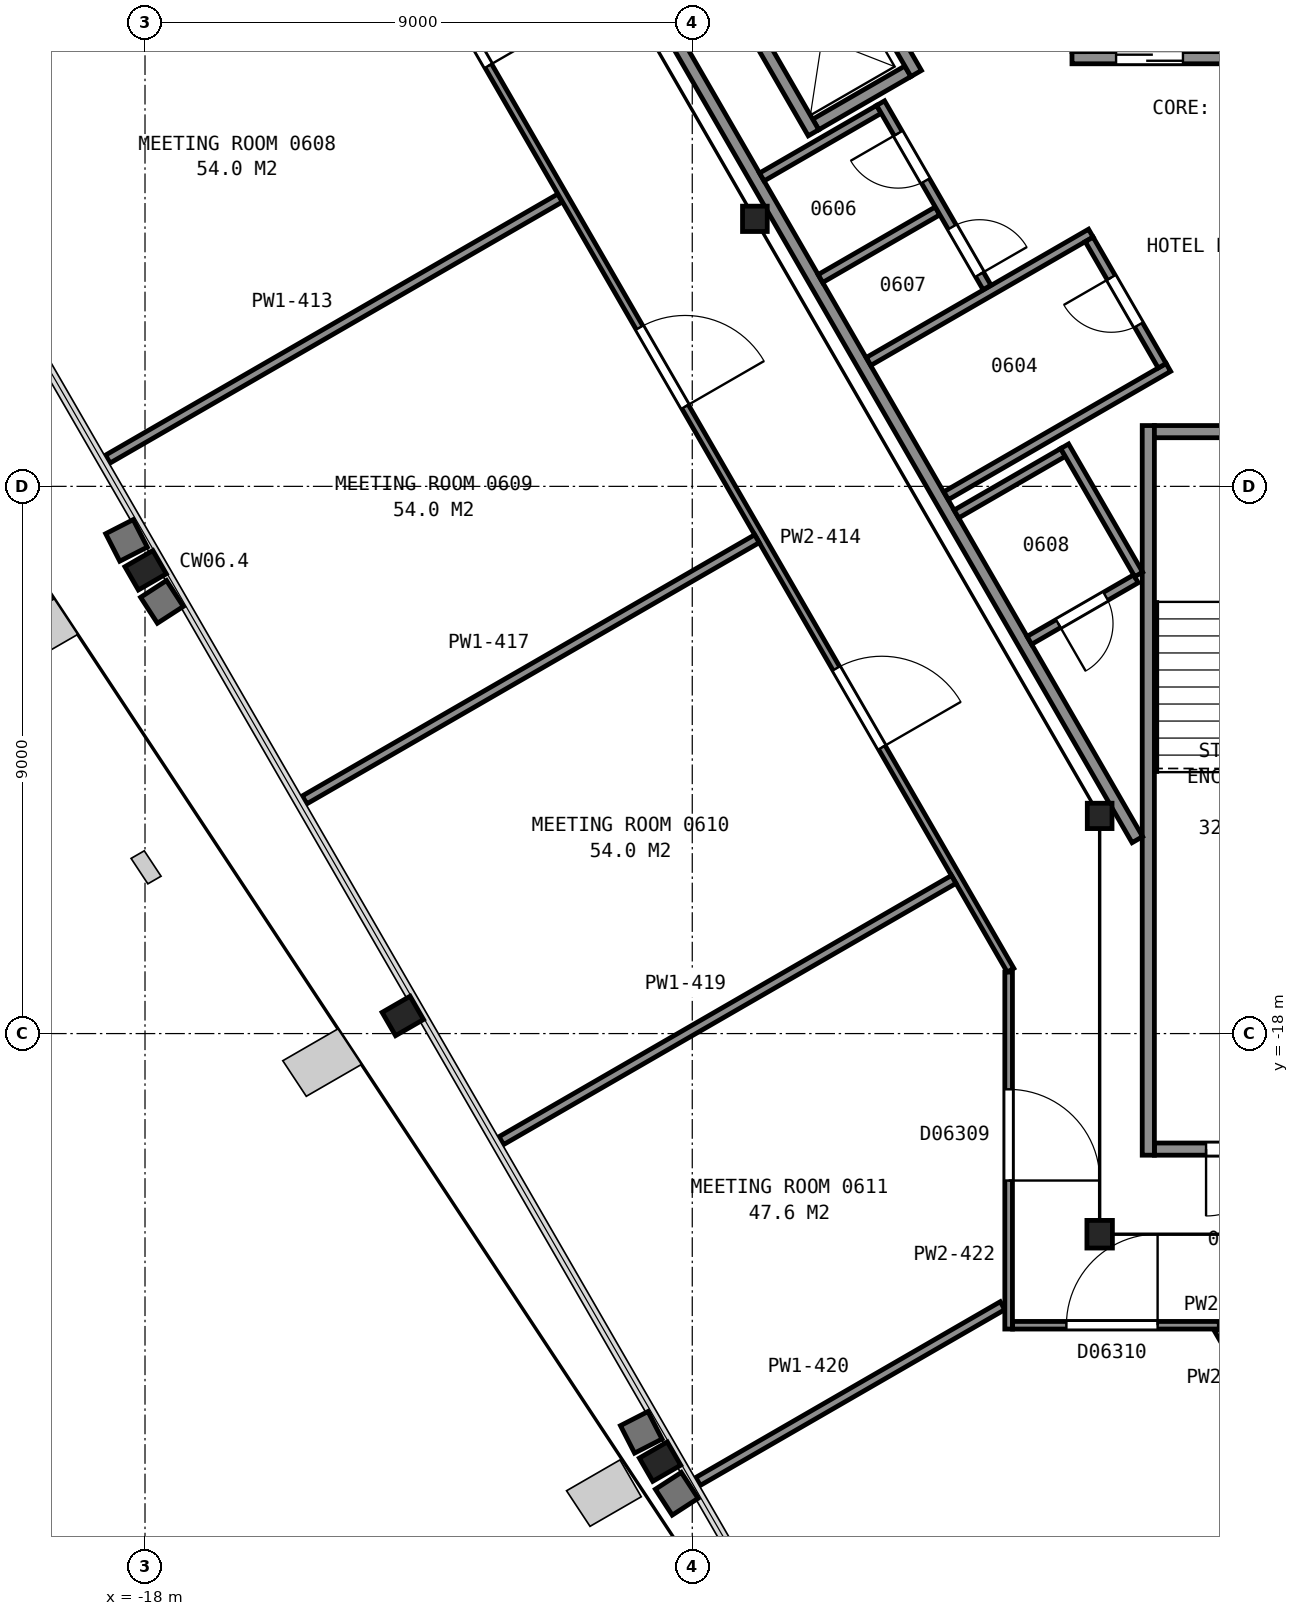
"""IFC4 building model, lengths in metres.
Left out: names, types, materials, properties, quantities, classifications, styles, units other than length and angle.
Written with IfcOpenShell. Run it as: python <this file> out.ifc"""

import sys

from ifc_helpers import new_model, si_unit, direction, frame, frame_2d, origin, origin_2d, place, context, subcontext, project, spatial, rectangle, i_section, extrude, element, fill, save


model = new_model("IFC4")
c1 = context("Model", 3, precision=1e-05, world=origin(), true_north=direction((0.0, 1.0)))
c2 = subcontext(c1, "Body", "Model", "MODEL_VIEW")
j1 = project(units=[si_unit("LENGTHUNIT", "METRE"), si_unit("PLANEANGLEUNIT", "RADIAN")], contexts=[c1])
p1 = place(None, origin())
s1 = spatial("IfcSite", under=j1, at=p1, CompositionType="ELEMENT")
p2 = place(p1, origin())
s2 = spatial("IfcBuilding", under=s1, at=p2, CompositionType="ELEMENT")
p3 = place(p2, frame((0.0, 0.0, 36.8)))
s3 = spatial("IfcBuildingStorey", under=s2, at=p3, CompositionType="ELEMENT", Elevation=36.8)
for number, where, z_axis, x_axis in (
    (1, (-17.99, -10.38, 0.025), (0.0, 0.0, 1.0), (-0.5, 0.866, 0.0)),
    (2, (-13.76, -17.71, 0.025), (0.0, 0.0, 1.0), (-0.5, 0.866, 0.0)),
):
    element("IfcColumn", number, at=place(p3, frame(where, z_axis=z_axis, x_axis=x_axis)), inside=s3, PredefinedType="COLUMN", context=c2, shape_type="SweptSolid", body=[
        extrude(i_section(OverallWidth=0.442, OverallDepth=0.531, WebThickness=0.066, FlangeThickness=0.106, FilletRadius=0.015, at=origin_2d()), origin(), (0.0, 0.0, 1.0), 3.575),
    ])
p4 = place(p3, frame((-9.53, -25.04, 0.03), z_axis=(0.0, 0.0, 1.0), x_axis=(-0.5, 0.866025403784, 0.0)))
e3 = element("IfcColumn", 3, at=p4, inside=s3, PredefinedType="COLUMN", context=c2, shape_type="SweptSolid", body=[
    extrude(i_section(OverallWidth=0.442, OverallDepth=0.531, WebThickness=0.066, FlangeThickness=0.106, FilletRadius=0.015, at=origin_2d()), origin(), (0.0, 0.0, 1.0), 3.57),
])
for number, where, z_axis, x_axis in (
    (4, (-7.97, -4.6, 0.0), (0.0, 0.0, 1.0), (1.0, 0.0, 0.0)),
    (5, (-2.3, -14.42, 0.0), (0.0, 0.0, 1.0), (1.0, 0.0, 0.0)),
):
    element("IfcColumn", number, at=place(p3, frame(where, z_axis=z_axis, x_axis=x_axis)), inside=s3, PredefinedType="COLUMN", context=c2, shape_type="SweptSolid", body=[
        extrude(i_section(OverallWidth=0.406, OverallDepth=0.417, WebThickness=0.03, FlangeThickness=0.048, FilletRadius=0.015, at=origin_2d()), origin(), (0.0, 0.0, 1.0), 3.6),
    ])
p5 = place(p3, frame((-2.3, -21.3, 0.0), z_axis=(0.0, 0.0, 1.0), x_axis=(-1.0, 0.0, 0.0)))
e6 = element("IfcColumn", 6, at=p5, inside=s3, PredefinedType="COLUMN", context=c2, shape_type="SweptSolid", body=[
    extrude(i_section(OverallWidth=0.419, OverallDepth=0.455, WebThickness=0.042, FlangeThickness=0.068, FilletRadius=0.015, at=origin_2d()), origin(), (0.0, 0.0, 1.0), 3.6),
])
p6 = place(p3, frame((-1.4, -19.9, 0.0), z_axis=(0.0, 0.0, 1.0), x_axis=(1.0, 0.0, 0.0)))
e7 = element("IfcWall", 7, at=p6, inside=s3, PredefinedType="PARTITIONING", context=c2, shape_type="SweptSolid", body=[
    extrude(rectangle(XDim=2.8, YDim=0.2, at=frame_2d((1.4, 0.0))), origin(), (0.0, 0.0, 1.0), 3.35),
])
p7 = place(p6, frame((0.85, 0.0, 0.0)))
e8 = element("IfcOpeningElement", 8, at=p7, cuts=e7, PredefinedType="OPENING", context=c2, shape_type="SweptSolid", body=[
    extrude(rectangle(XDim=1.1, YDim=2.1, at=frame_2d((0.55, 1.05))), frame((0.0, 0.11, 0.0), z_axis=(0.0, -1.0, 0.0), x_axis=(1.0, 0.0, 0.0)), (0.0, 0.0, 1.0), 0.22),
])
p8 = place(p3, frame((-1.5, -8.0, 0.0), z_axis=(0.0, 0.0, 1.0), x_axis=(0.0, -1.0, 0.0)))
e9 = element("IfcWall", 9, at=p8, inside=s3, PredefinedType="PARTITIONING", context=c2, shape_type="SweptSolid", body=[
    extrude(rectangle(XDim=12.0, YDim=0.2, at=frame_2d((6.0, 0.0))), origin(), (0.0, 0.0, 1.0), 3.35),
])
p9 = place(p3, frame((-1.4, -8.1, 0.0), z_axis=(0.0, 0.0, 1.0), x_axis=(1.0, 0.0, 0.0)))
e10 = element("IfcWall", 10, at=p9, inside=s3, PredefinedType="PARTITIONING", context=c2, shape_type="SweptSolid", body=[
    extrude(rectangle(XDim=2.8, YDim=0.2, at=frame_2d((1.4, 0.0))), origin(), (0.0, 0.0, 1.0), 3.35),
])
p10 = place(p3, frame((-2.755, -1.95, 0.0), z_axis=(0.0, 0.0, 1.0), x_axis=(1.0, 0.0, 0.0)))
e11 = element("IfcWall", 11, at=p10, inside=s3, PredefinedType="PARTITIONING", context=c2, shape_type="SweptSolid", body=[
    extrude(rectangle(XDim=2.55, YDim=0.2, at=frame_2d((1.275, 0.0))), origin(), (0.0, 0.0, 1.0), 3.6),
])
p11 = place(p10, frame((0.725, 0.0, 0.0)))
e12 = element("IfcOpeningElement", 12, at=p11, cuts=e11, PredefinedType="OPENING", context=c2, shape_type="SweptSolid", body=[
    extrude(rectangle(XDim=1.1, YDim=2.1, at=frame_2d((0.55, 1.05))), frame((0.0, 0.11, 0.0), z_axis=(0.0, -1.0, 0.0), x_axis=(1.0, 0.0, 0.0)), (0.0, 0.0, 1.0), 0.22),
])
p12 = place(p3, frame((-6.97, -3.048, 0.0), z_axis=(0.0, 0.0, 1.0), x_axis=(0.866036909293, 0.499980071345, 0.0)))
e13 = element("IfcWall", 13, at=p12, inside=s3, PredefinedType="PARTITIONING", context=c2, shape_type="SweptSolid", body=[
    extrude(rectangle(XDim=1.75, YDim=0.2, at=frame_2d((0.875, 0.0))), origin(), (0.0, 0.0, 1.0), 3.6),
])
p13 = place(p3, frame((-5.318, -2.21, 0.0), z_axis=(0.0, 0.0, 1.0), x_axis=(-0.499938297808, 0.866061024631, 0.0)))
e14 = element("IfcWall", 14, at=p13, inside=s3, PredefinedType="PARTITIONING", context=c2, shape_type="SweptSolid", body=[
    extrude(rectangle(XDim=2.35, YDim=0.2, at=frame_2d((1.175, 0.0))), origin(), (0.0, 0.0, 1.0), 3.6),
])
p14 = place(p13, frame((0.725, 0.0, 0.0)))
e15 = element("IfcOpeningElement", 15, at=p14, cuts=e14, PredefinedType="OPENING", context=c2, shape_type="SweptSolid", body=[
    extrude(rectangle(XDim=1.1, YDim=2.1, at=frame_2d((0.55, 1.05))), frame((0.0, 0.11, 0.0), z_axis=(0.0, -1.0, 0.0), x_axis=(1.0, 0.0, 0.0)), (0.0, 0.0, 1.0), 0.22),
])
p15 = place(p3, frame((-7.006, -3.185, 0.0), z_axis=(0.0, 0.0, 1.0), x_axis=(-0.499990435942, 0.866030925526, 0.0)))
e16 = element("IfcWall", 16, at=p15, inside=s3, PredefinedType="PARTITIONING", context=c2, shape_type="SweptSolid", body=[
    extrude(rectangle(XDim=2.55, YDim=0.2, at=frame_2d((1.275, 0.0))), origin(), (0.0, 0.0, 1.0), 3.6),
])
p16 = place(p3, frame((-13.664, 5.946, 0.0), z_axis=(0.0, 0.0, 1.0), x_axis=(0.499994327219, -0.866028678941, 0.0)))
e17 = element("IfcWall", 17, at=p16, inside=s3, PredefinedType="PARTITIONING", context=c2, shape_type="SweptSolid", body=[
    extrude(rectangle(XDim=23.968, YDim=0.2, at=frame_2d((11.984, 0.0))), origin(), (0.0, 0.0, 1.0), 3.35),
])
p17 = place(p3, frame((-7.856, -3.912, 0.0), z_axis=(0.0, 0.0, 1.0), x_axis=(0.865971748, 0.500092923031, 0.0)))
e18 = element("IfcWall", 18, at=p17, inside=s3, PredefinedType="PARTITIONING", context=c2, shape_type="SweptSolid", body=[
    extrude(rectangle(XDim=2.225, YDim=0.15, at=frame_2d((1.112, 0.0))), origin(), (0.0, 0.0, 1.0), 3.35),
])
p18 = place(p3, frame((-6.892, -5.582, 0.0), z_axis=(0.0, 0.0, 1.0), x_axis=(0.865944298464, 0.500140452231, 0.0)))
e19 = element("IfcWall", 19, at=p18, inside=s3, PredefinedType="PARTITIONING", context=c2, shape_type="SweptSolid", body=[
    extrude(rectangle(XDim=2.224, YDim=0.15, at=frame_2d((1.112, 0.0))), origin(), (0.0, 0.0, 1.0), 3.35),
])
p19 = place(p3, frame((-6.1, -6.946, 0.0), z_axis=(0.0, 0.0, 1.0), x_axis=(0.866038200431, 0.499977834903, 0.0)))
e20 = element("IfcWall", 20, at=p19, inside=s3, PredefinedType="PARTITIONING", context=c2, shape_type="SweptSolid", body=[
    extrude(rectangle(XDim=4.22, YDim=0.15, at=frame_2d((2.11, 0.0))), origin(), (0.0, 0.0, 1.0), 3.35),
])
p20 = place(p3, frame((-4.152, -5.729, 0.0), z_axis=(0.0, 0.0, 1.0), x_axis=(-0.500024287448, 0.866011380966, 0.0)))
e21 = element("IfcWall", 21, at=p20, inside=s3, PredefinedType="PARTITIONING", context=c2, shape_type="SweptSolid", body=[
    extrude(rectangle(XDim=3.501, YDim=0.15, at=frame_2d((1.75, 0.0))), origin(), (0.0, 0.0, 1.0), 3.35),
])
p21 = place(p20, frame((2.026, 0.0, 0.0)))
e22 = element("IfcOpeningElement", 22, at=p21, cuts=e21, PredefinedType="OPENING", context=c2, shape_type="SweptSolid", body=[
    extrude(rectangle(XDim=0.9, YDim=2.1, at=frame_2d((0.45, 1.05))), frame((0.0, 0.085, 0.0), z_axis=(0.0, -1.0, 0.0), x_axis=(1.0, 0.0, 0.0)), (0.0, 0.0, 1.0), 0.17),
])
p22 = place(p20, frame((0.248, 0.0, 0.0)))
e23 = element("IfcOpeningElement", 23, at=p22, cuts=e21, PredefinedType="OPENING", context=c2, shape_type="SweptSolid", body=[
    extrude(rectangle(XDim=0.9, YDim=2.1, at=frame_2d((0.45, 1.05))), frame((0.0, 0.085, 0.0), z_axis=(0.0, -1.0, 0.0), x_axis=(1.0, 0.0, 0.0)), (0.0, 0.0, 1.0), 0.17),
])
p23 = place(p3, frame((-4.825, -9.154, 0.0), z_axis=(0.0, 0.0, 1.0), x_axis=(0.866023738697, 0.500002884005, 0.0)))
e24 = element("IfcWall", 24, at=p23, inside=s3, PredefinedType="PARTITIONING", context=c2, shape_type="SweptSolid", body=[
    extrude(rectangle(XDim=4.22, YDim=0.15, at=frame_2d((2.11, 0.0))), origin(), (0.0, 0.0, 1.0), 3.35),
])
p24 = place(p3, frame((-4.656, -9.455, 0.0), z_axis=(0.0, 0.0, 1.0), x_axis=(0.86597878118, 0.500080744026, 0.0)))
e25 = element("IfcWall", 25, at=p24, inside=s3, PredefinedType="PARTITIONING", context=c2, shape_type="SweptSolid", body=[
    extrude(rectangle(XDim=2.025, YDim=0.15, at=frame_2d((1.013, 0.0))), origin(), (0.0, 0.0, 1.0), 3.35),
])
p25 = place(p3, frame((-3.456, -11.533, 0.0), z_axis=(0.0, 0.0, 1.0), x_axis=(0.866000843773, 0.500042536776, 0.0)))
e26 = element("IfcWall", 26, at=p25, inside=s3, PredefinedType="PARTITIONING", context=c2, shape_type="SweptSolid", body=[
    extrude(rectangle(XDim=2.025, YDim=0.15, at=frame_2d((1.012, 0.0))), origin(), (0.0, 0.0, 1.0), 3.35),
])
p26 = place(p25, frame((0.55, 0.0, 0.0)))
e27 = element("IfcOpeningElement", 27, at=p26, cuts=e26, PredefinedType="OPENING", context=c2, shape_type="SweptSolid", body=[
    extrude(rectangle(XDim=0.9, YDim=2.1, at=frame_2d((0.45, 1.05))), frame((0.0, 0.085, 0.0), z_axis=(0.0, -1.0, 0.0), x_axis=(1.0, 0.0, 0.0)), (0.0, 0.0, 1.0), 0.17),
])
p27 = place(p3, frame((-2.875, -8.34, 0.0), z_axis=(0.0, 0.0, 1.0), x_axis=(0.500118864444, -0.865956766488, 0.0)))
e28 = element("IfcWall", 28, at=p27, inside=s3, PredefinedType="PARTITIONING", context=c2, shape_type="SweptSolid", body=[
    extrude(rectangle(XDim=2.435, YDim=0.15, at=frame_2d((1.217, 0.0))), origin(), (0.0, 0.0, 1.0), 3.35),
])
p28 = place(p3, frame((-1.272, -7.016, 0.0), z_axis=(0.0, 0.0, 1.0), x_axis=(-0.500045362686, 0.865999212041, 0.0)))
e29 = element("IfcWall", 29, at=p28, inside=s3, PredefinedType="PARTITIONING", context=c2, shape_type="SweptSolid", body=[
    extrude(rectangle(XDim=2.4, YDim=0.15, at=frame_2d((1.2, 0.0))), origin(), (0.0, 0.0, 1.0), 3.35),
])
p29 = place(p28, frame((0.775, 0.0, 0.0)))
e30 = element("IfcOpeningElement", 30, at=p29, cuts=e29, PredefinedType="OPENING", context=c2, shape_type="SweptSolid", body=[
    extrude(rectangle(XDim=0.9, YDim=2.1, at=frame_2d((0.45, 1.05))), frame((0.0, 0.085, 0.0), z_axis=(0.0, -1.0, 0.0), x_axis=(1.0, 0.0, 0.0)), (0.0, 0.0, 1.0), 0.17),
])
p30 = place(p3, frame((-21.848, -2.948, 0.0), z_axis=(0.0, 0.0, 1.0), x_axis=(0.865958884393, 0.500115197271, 0.0)))
e31 = element("IfcWall", 31, at=p30, inside=s3, PredefinedType="PARTITIONING", context=c2, shape_type="SweptSolid", body=[
    extrude(rectangle(XDim=8.591, YDim=0.15, at=frame_2d((4.296, 0.0))), origin(), (0.0, 0.0, 1.0), 2.613),
])
p31 = place(p3, frame((-18.612, -8.552, 0.0), z_axis=(0.0, 0.0, 1.0), x_axis=(0.866034625887, 0.499984026509, 0.0)))
e32 = element("IfcWall", 32, at=p31, inside=s3, PredefinedType="PARTITIONING", context=c2, shape_type="SweptSolid", body=[
    extrude(rectangle(XDim=8.591, YDim=0.15, at=frame_2d((4.295, 0.0))), origin(), (0.0, 0.0, 1.0), 2.613),
])
p32 = place(p3, frame((-3.766, -16.958, 0.0), z_axis=(0.0, 0.0, 1.0), x_axis=(-0.500024758804, 0.866011108811, 0.0)))
e33 = element("IfcWall", 33, at=p32, inside=s3, PredefinedType="PARTITIONING", context=c2, shape_type="SweptSolid", body=[
    extrude(rectangle(XDim=26.402, YDim=0.125, at=frame_2d((13.201, 0.0))), origin(), (0.0, 0.0, 1.0), 2.613),
])
p33 = place(p32, frame((22.989, 0.0, 0.0)))
e34 = element("IfcOpeningElement", 34, at=p33, cuts=e33, PredefinedType="OPENING", context=c2, shape_type="SweptSolid", body=[
    extrude(rectangle(XDim=1.5, YDim=2.1, at=frame_2d((0.75, 1.05))), frame((0.0, 0.073, 0.0), z_axis=(0.0, -1.0, 0.0), x_axis=(1.0, 0.0, 0.0)), (0.0, 0.0, 1.0), 0.145),
])
p34 = place(p32, frame((17.175, 0.0, 0.0)))
e35 = element("IfcOpeningElement", 35, at=p34, cuts=e33, PredefinedType="OPENING", context=c2, shape_type="SweptSolid", body=[
    extrude(rectangle(XDim=1.5, YDim=2.1, at=frame_2d((0.75, 1.05))), frame((0.0, 0.073, 0.0), z_axis=(0.0, -1.0, 0.0), x_axis=(1.0, 0.0, 0.0)), (0.0, 0.0, 1.0), 0.145),
])
p35 = place(p32, frame((10.703, 0.0, 0.0)))
e36 = element("IfcOpeningElement", 36, at=p35, cuts=e33, PredefinedType="OPENING", context=c2, shape_type="SweptSolid", body=[
    extrude(rectangle(XDim=1.5, YDim=2.1, at=frame_2d((0.75, 1.05))), frame((0.0, 0.073, 0.0), z_axis=(0.0, -1.0, 0.0), x_axis=(1.0, 0.0, 0.0)), (0.0, 0.0, 1.0), 0.145),
])
p36 = place(p32, frame((4.231, 0.0, 0.0)))
e37 = element("IfcOpeningElement", 37, at=p36, cuts=e33, PredefinedType="OPENING", context=c2, shape_type="SweptSolid", body=[
    extrude(rectangle(XDim=1.5, YDim=2.1, at=frame_2d((0.75, 1.05))), frame((0.0, 0.073, 0.0), z_axis=(0.0, -1.0, 0.0), x_axis=(1.0, 0.0, 0.0)), (0.0, 0.0, 1.0), 0.145),
])
for number, where, z_axis, x_axis in (
    (38, (-15.376, -14.157, 0.0), (0.0, 0.0, 1.0), (0.866, 0.5, 0.0)),
    (39, (-12.141, -19.761, 0.0), (0.0, 0.0, 1.0), (0.866, 0.5, 0.0)),
):
    element("IfcWall", number, at=place(p3, frame(where, z_axis=z_axis, x_axis=x_axis)), inside=s3, PredefinedType="PARTITIONING", context=c2, shape_type="SweptSolid", body=[
        extrude(rectangle(XDim=8.591, YDim=0.15, at=frame_2d((4.296, 0.0))), origin(), (0.0, 0.0, 1.0), 2.613),
    ])
p37 = place(p3, frame((-8.905, -25.366, 0.0), z_axis=(0.0, 0.0, 1.0), x_axis=(0.866025977343, 0.499999006567, 0.0)))
e40 = element("IfcWall", 40, at=p37, inside=s3, PredefinedType="PARTITIONING", context=c2, shape_type="SweptSolid", body=[
    extrude(rectangle(XDim=5.782, YDim=0.15, at=frame_2d((2.891, 0.0))), origin(), (0.0, 0.0, 1.0), 2.613),
])
p38 = place(p3, frame((-3.797, -22.86, 0.0), z_axis=(0.0, 0.0, 1.0), x_axis=(0.0, 1.0, 0.0)))
e41 = element("IfcWall", 41, at=p38, inside=s3, PredefinedType="PARTITIONING", context=c2, shape_type="SweptSolid", body=[
    extrude(rectangle(XDim=5.871, YDim=0.125, at=frame_2d((2.935, 0.0))), origin(), (0.0, 0.0, 1.0), 2.613),
])
p39 = place(p38, frame((2.442, 0.0, 0.0)))
e42 = element("IfcOpeningElement", 42, at=p39, cuts=e41, PredefinedType="OPENING", context=c2, shape_type="SweptSolid", body=[
    extrude(rectangle(XDim=1.5, YDim=2.1, at=frame_2d((0.75, 1.05))), frame((0.0, 0.073, 0.0), z_axis=(0.0, -1.0, 0.0), x_axis=(1.0, 0.0, 0.0)), (0.0, 0.0, 1.0), 0.145),
])
p40 = place(p3, frame((-0.333, -22.797, 0.0), z_axis=(0.0, 0.0, 1.0), x_axis=(-1.0, 0.0, 0.0)))
e43 = element("IfcWall", 43, at=p40, inside=s3, PredefinedType="PARTITIONING", context=c2, shape_type="SweptSolid", body=[
    extrude(rectangle(XDim=3.399, YDim=0.125, at=frame_2d((1.7, 0.0))), origin(), (0.0, 0.0, 1.0), 2.613),
])
p41 = place(p40, frame((1.014, 0.0, 0.0)))
e44 = element("IfcOpeningElement", 44, at=p41, cuts=e43, PredefinedType="OPENING", context=c2, shape_type="SweptSolid", body=[
    extrude(rectangle(XDim=1.5, YDim=2.1, at=frame_2d((0.75, 1.05))), frame((0.0, 0.073, 0.0), z_axis=(0.0, -1.0, 0.0), x_axis=(1.0, 0.0, 0.0)), (0.0, 0.0, 1.0), 0.145),
])
p42 = place(p3, frame((-0.353, -22.871, 0.0), z_axis=(0.0, 0.0, 1.0), x_axis=(0.499863517517, -0.866104187645, 0.0)))
e45 = element("IfcWall", 45, at=p42, inside=s3, PredefinedType="PARTITIONING", context=c2, shape_type="SweptSolid", body=[
    extrude(rectangle(XDim=0.599, YDim=0.125, at=frame_2d((0.3, 0.0))), origin(), (0.0, 0.0, 1.0), 2.613),
])
p43 = place(p7, origin())
e46 = element("IfcDoor", 46, at=p43, inside=s3, OperationType="SINGLE_SWING_LEFT", PredefinedType="DOOR", context=c2, shape_type="SweptSolid", body=[
    extrude(rectangle(XDim=1.1, YDim=2.1, at=frame_2d((0.55, 1.05))), frame((0.0, 0.025, 0.0), z_axis=(0.0, -1.0, 0.0), x_axis=(1.0, 0.0, 0.0)), (0.0, 0.0, 1.0), 0.05),
])
fill(e8, e46)
p44 = place(p11, origin())
e47 = element("IfcDoor", 47, at=p44, inside=s3, OperationType="SLIDING_TO_RIGHT", PredefinedType="DOOR", context=c2, shape_type="SweptSolid", body=[
    extrude(rectangle(XDim=1.1, YDim=2.1, at=frame_2d((0.55, 1.05))), frame((0.0, 0.025, 0.0), z_axis=(0.0, -1.0, 0.0), x_axis=(1.0, 0.0, 0.0)), (0.0, 0.0, 1.0), 0.05),
])
fill(e12, e47)
p45 = place(p21, origin())
e48 = element("IfcDoor", 48, at=p45, inside=s3, OperationType="SINGLE_SWING_RIGHT", PredefinedType="DOOR", context=c2, shape_type="SweptSolid", body=[
    extrude(rectangle(XDim=0.9, YDim=2.1, at=frame_2d((0.45, 1.05))), frame((0.0, 0.025, 0.0), z_axis=(0.0, -1.0, 0.0), x_axis=(1.0, 0.0, 0.0)), (0.0, 0.0, 1.0), 0.05),
])
fill(e22, e48)
p46 = place(p22, origin())
e49 = element("IfcDoor", 49, at=p46, inside=s3, OperationType="SINGLE_SWING_LEFT", PredefinedType="DOOR", context=c2, shape_type="SweptSolid", body=[
    extrude(rectangle(XDim=0.9, YDim=2.1, at=frame_2d((0.45, 1.05))), frame((0.0, 0.025, 0.0), z_axis=(0.0, -1.0, 0.0), x_axis=(1.0, 0.0, 0.0)), (0.0, 0.0, 1.0), 0.05),
])
fill(e23, e49)
p47 = place(p26, origin())
e50 = element("IfcDoor", 50, at=p47, inside=s3, OperationType="SINGLE_SWING_LEFT", PredefinedType="DOOR", context=c2, shape_type="SweptSolid", body=[
    extrude(rectangle(XDim=0.9, YDim=2.1, at=frame_2d((0.45, 1.05))), frame((0.0, 0.025, 0.0), z_axis=(0.0, -1.0, 0.0), x_axis=(1.0, 0.0, 0.0)), (0.0, 0.0, 1.0), 0.05),
])
fill(e27, e50)
p48 = place(p29, origin())
e51 = element("IfcDoor", 51, at=p48, inside=s3, OperationType="SINGLE_SWING_RIGHT", PredefinedType="DOOR", context=c2, shape_type="SweptSolid", body=[
    extrude(rectangle(XDim=0.9, YDim=2.1, at=frame_2d((0.45, 1.05))), frame((0.0, 0.025, 0.0), z_axis=(0.0, -1.0, 0.0), x_axis=(1.0, 0.0, 0.0)), (0.0, 0.0, 1.0), 0.05),
])
fill(e30, e51)
p49 = place(p34, origin())
e52 = element("IfcDoor", 52, at=p49, inside=s3, OperationType="DOUBLE_DOOR_SINGLE_SWING", PredefinedType="DOOR", context=c2, shape_type="SweptSolid", body=[
    extrude(rectangle(XDim=1.5, YDim=2.1, at=frame_2d((0.75, 1.05))), frame((0.0, 0.025, 0.0), z_axis=(0.0, -1.0, 0.0), x_axis=(1.0, 0.0, 0.0)), (0.0, 0.0, 1.0), 0.05),
])
fill(e35, e52)
p50 = place(p35, origin())
e53 = element("IfcDoor", 53, at=p50, inside=s3, OperationType="DOUBLE_DOOR_SINGLE_SWING", PredefinedType="DOOR", context=c2, shape_type="SweptSolid", body=[
    extrude(rectangle(XDim=1.5, YDim=2.1, at=frame_2d((0.75, 1.05))), frame((0.0, 0.025, 0.0), z_axis=(0.0, -1.0, 0.0), x_axis=(1.0, 0.0, 0.0)), (0.0, 0.0, 1.0), 0.05),
])
fill(e36, e53)
p51 = place(p36, origin())
e54 = element("IfcDoor", 54, at=p51, inside=s3, OperationType="DOUBLE_DOOR_SINGLE_SWING", PredefinedType="DOOR", context=c2, shape_type="SweptSolid", body=[
    extrude(rectangle(XDim=1.5, YDim=2.1, at=frame_2d((0.75, 1.05))), frame((0.0, 0.025, 0.0), z_axis=(0.0, -1.0, 0.0), x_axis=(1.0, 0.0, 0.0)), (0.0, 0.0, 1.0), 0.05),
])
fill(e37, e54)
p52 = place(p39, origin())
e55 = element("IfcDoor", 55, at=p52, inside=s3, OperationType="DOUBLE_DOOR_SINGLE_SWING", PredefinedType="DOOR", context=c2, shape_type="SweptSolid", body=[
    extrude(rectangle(XDim=1.5, YDim=2.1, at=frame_2d((0.75, 1.05))), frame((0.0, 0.025, 0.0), z_axis=(0.0, -1.0, 0.0), x_axis=(1.0, 0.0, 0.0)), (0.0, 0.0, 1.0), 0.05),
])
fill(e42, e55)
p53 = place(p41, origin())
e56 = element("IfcDoor", 56, at=p53, inside=s3, OperationType="DOUBLE_DOOR_SINGLE_SWING", PredefinedType="DOOR", context=c2, shape_type="SweptSolid", body=[
    extrude(rectangle(XDim=1.5, YDim=2.1, at=frame_2d((0.75, 1.05))), frame((0.0, 0.025, 0.0), z_axis=(0.0, -1.0, 0.0), x_axis=(1.0, 0.0, 0.0)), (0.0, 0.0, 1.0), 0.05),
])
fill(e44, e56)
save(model, sys.argv[1])
